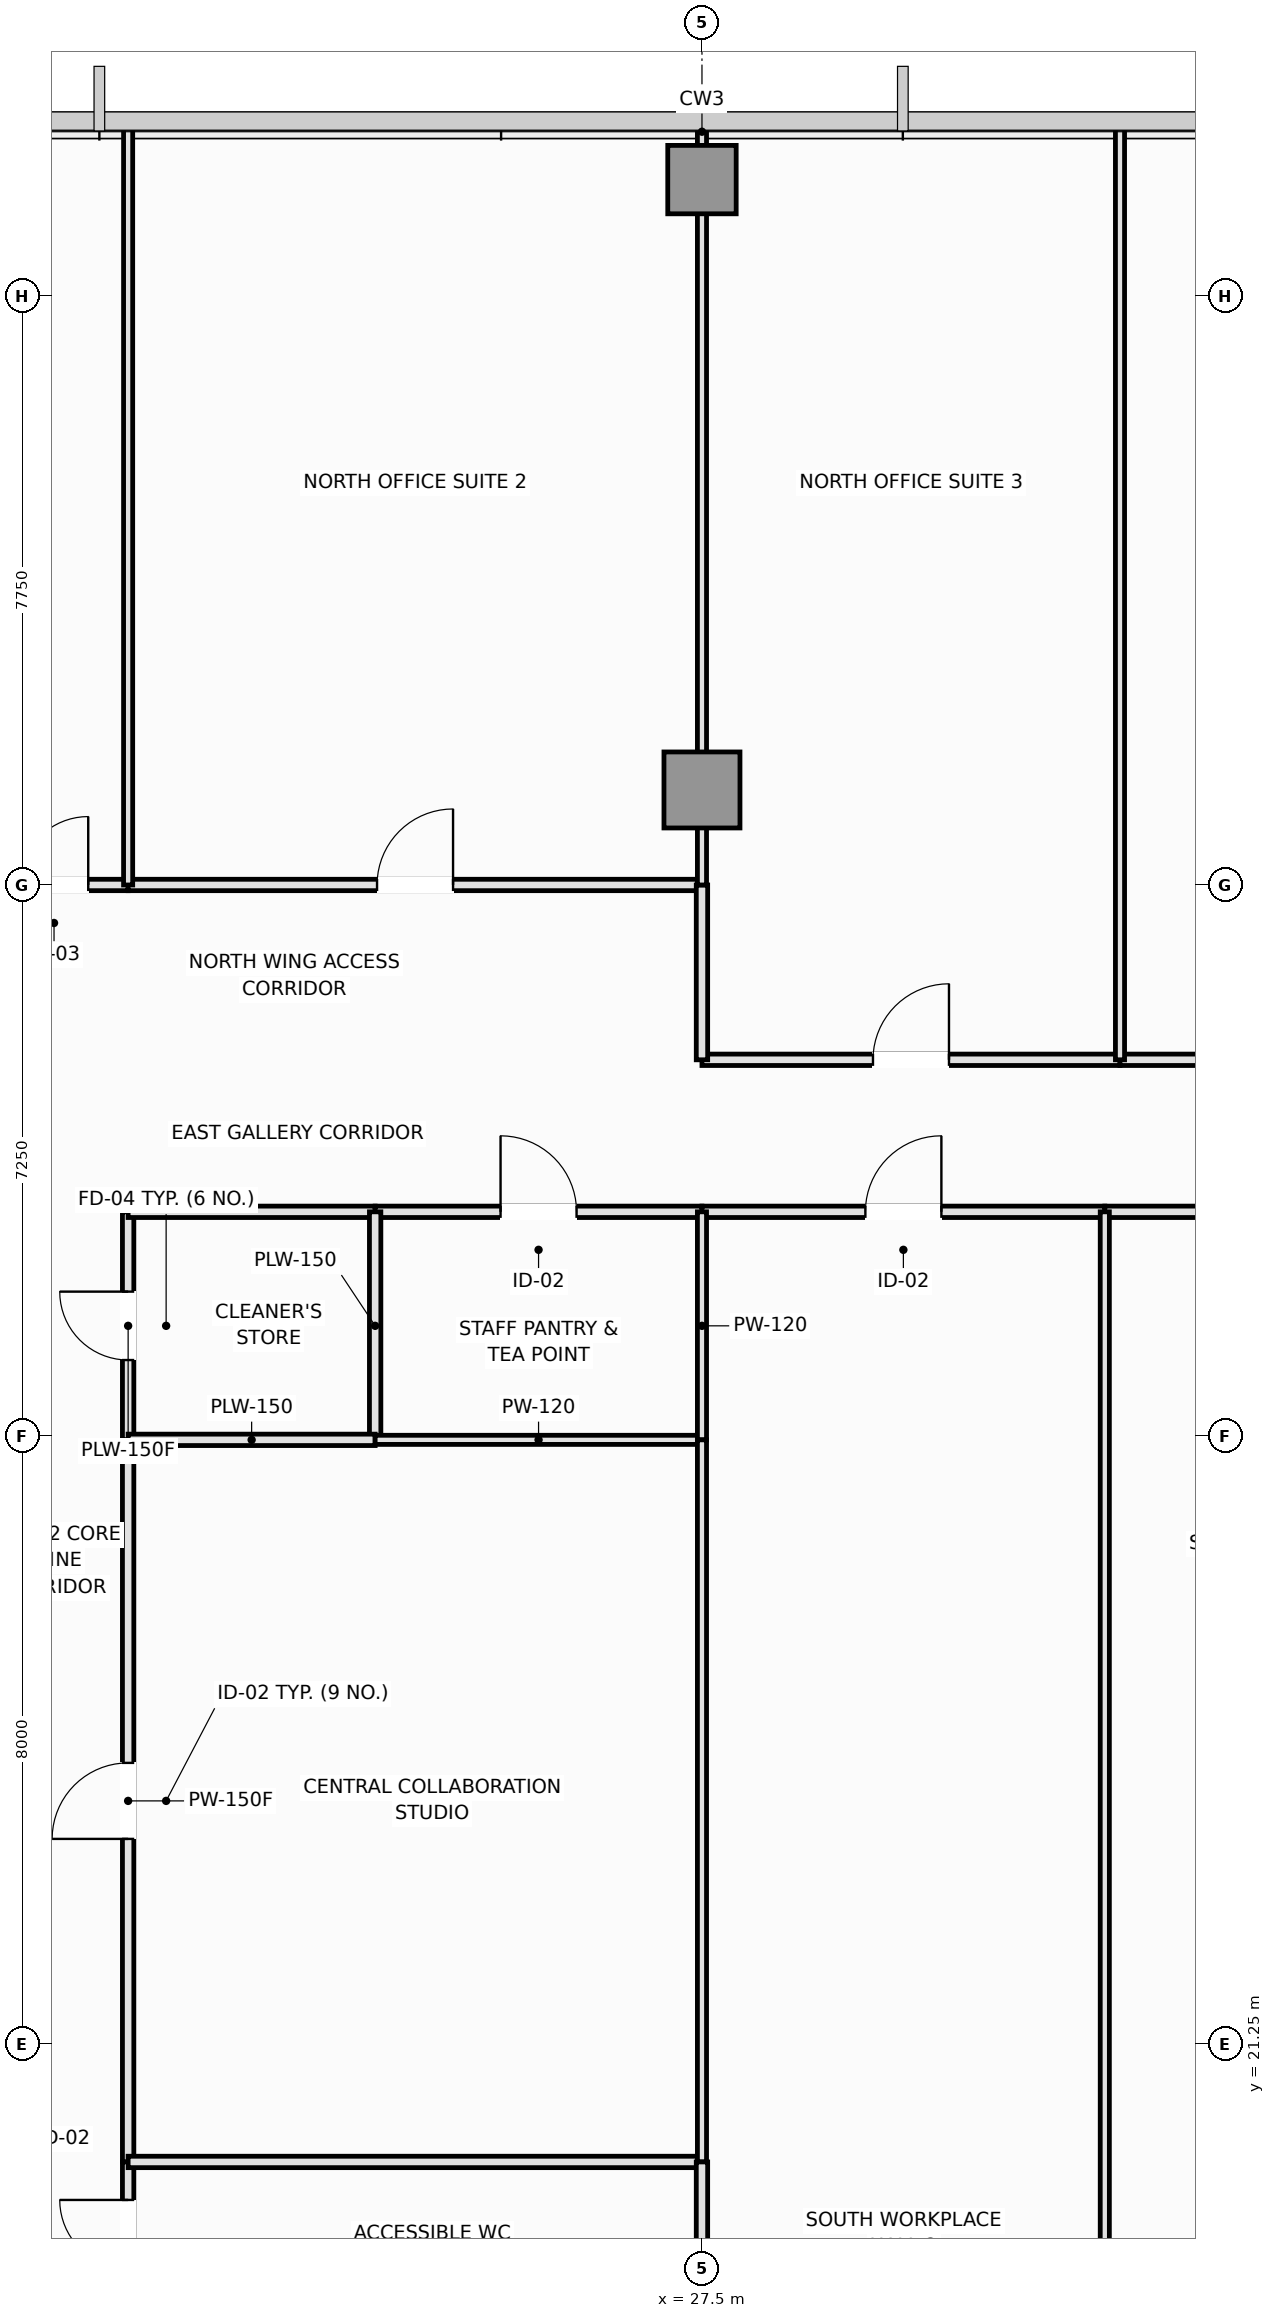
"""IFC4 building model, lengths in metres.
Left out: names, types, materials, properties, quantities, classifications, styles, units other than length and angle.
Written with IfcOpenShell. Run it as: python <this file> out.ifc"""

import sys

from ifc_helpers import new_model, si_unit, direction, frame, frame_2d, origin, origin_2d, place, context, subcontext, project, spatial, rectangle, extrude, element, fill, save


model = new_model("IFC4")
c1 = context("Model", 3, precision=1e-05, world=origin(), true_north=direction((0.0, 1.0)))
c2 = subcontext(c1, "Body", "Model", "MODEL_VIEW")
j1 = project(units=[si_unit("LENGTHUNIT", "METRE"), si_unit("PLANEANGLEUNIT", "RADIAN")], contexts=[c1])
p1 = place(None, origin())
s1 = spatial("IfcSite", under=j1, at=p1, CompositionType="ELEMENT")
p2 = place(p1, origin())
s2 = spatial("IfcBuilding", under=s1, at=p2, CompositionType="ELEMENT")
p3 = place(p2, frame((0.0, 0.0, 116.45)))
s3 = spatial("IfcBuildingStorey", under=s2, at=p3, CompositionType="ELEMENT", Elevation=116.45)
p4 = place(p3, frame((27.5, 37.75, 0.0), z_axis=(0.0, 0.0, 1.0), x_axis=(1.0, 0.0, 0.0)))
e1 = element("IfcColumn", 1, at=p4, inside=s3, PredefinedType="COLUMN", context=c2, shape_type="SweptSolid", body=[
    extrude(rectangle(XDim=1.0, YDim=1.0, at=origin_2d()), origin(), (0.0, 0.0, 1.0), 3.55),
])
p5 = place(p3, frame((27.5, 45.78, 0.0), z_axis=(0.0, 0.0, 1.0), x_axis=(1.0, 0.0, 0.0)))
e2 = element("IfcColumn", 2, at=p5, inside=s3, PredefinedType="COLUMN", context=c2, shape_type="SweptSolid", body=[
    extrude(rectangle(XDim=0.9, YDim=0.9, at=origin_2d()), origin(), (0.0, 0.0, 1.0), 3.55),
])
p6 = place(p3, frame((19.95, 29.2, 0.0), z_axis=(0.0, 0.0, 1.0), x_axis=(0.0, 1.0, 0.0)))
e3 = element("IfcWall", 3, at=p6, inside=s3, PredefinedType="PLUMBINGWALL", context=c2, shape_type="SweptSolid", body=[
    extrude(rectangle(XDim=3.0, YDim=0.15, at=frame_2d((1.5, 0.0))), origin(), (0.0, 0.0, 1.0), 3.37),
])
p7 = place(p6, frame((1.05, 0.0, 0.0)))
e4 = element("IfcOpeningElement", 4, at=p7, cuts=e3, PredefinedType="OPENING", context=c2, shape_type="SweptSolid", body=[
    extrude(rectangle(XDim=0.9, YDim=2.1, at=frame_2d((0.45, 1.05))), frame((0.0, 0.085, 0.0), z_axis=(0.0, -1.0, 0.0), x_axis=(1.0, 0.0, 0.0)), (0.0, 0.0, 1.0), 0.17),
])
p8 = place(p3, frame((19.95, 19.7, 0.0), z_axis=(0.0, 0.0, 1.0), x_axis=(0.0, 1.0, 0.0)))
e5 = element("IfcWall", 5, at=p8, inside=s3, PredefinedType="PARTITIONING", context=c2, shape_type="SweptSolid", body=[
    extrude(rectangle(XDim=9.5, YDim=0.15, at=frame_2d((4.75, 0.0))), origin(), (0.0, 0.0, 1.0), 3.37),
])
p9 = place(p8, frame((4.25, 0.0, 0.0)))
e6 = element("IfcOpeningElement", 6, at=p9, cuts=e5, PredefinedType="OPENING", context=c2, shape_type="SweptSolid", body=[
    extrude(rectangle(XDim=1.0, YDim=2.15, at=frame_2d((0.5, 1.075))), frame((0.0, 0.085, 0.0), z_axis=(0.0, -1.0, 0.0), x_axis=(1.0, 0.0, 0.0)), (0.0, 0.0, 1.0), 0.17),
])
p10 = place(p3, frame((19.95, 17.8, 0.0), z_axis=(0.0, 0.0, 1.0), x_axis=(0.0, 1.0, 0.0)))
e7 = element("IfcWall", 7, at=p10, inside=s3, PredefinedType="PLUMBINGWALL", context=c2, shape_type="SweptSolid", body=[
    extrude(rectangle(XDim=1.9, YDim=0.15, at=frame_2d((0.95, 0.0))), origin(), (0.0, 0.0, 1.0), 3.37),
])
p11 = place(p10, frame((0.5, 0.0, 0.0)))
e8 = element("IfcOpeningElement", 8, at=p11, cuts=e7, PredefinedType="OPENING", context=c2, shape_type="SweptSolid", body=[
    extrude(rectangle(XDim=0.9, YDim=2.1, at=frame_2d((0.45, 1.05))), frame((0.0, 0.085, 0.0), z_axis=(0.0, -1.0, 0.0), x_axis=(1.0, 0.0, 0.0)), (0.0, 0.0, 1.0), 0.17),
])
p12 = place(p3, frame((18.0, 36.5, 0.0), z_axis=(0.0, 0.0, 1.0), x_axis=(1.0, 0.0, 0.0)))
e9 = element("IfcWall", 9, at=p12, inside=s3, PredefinedType="PARTITIONING", context=c2, shape_type="SweptSolid", body=[
    extrude(rectangle(XDim=1.95, YDim=0.15, at=frame_2d((0.975, 0.0))), origin(), (0.0, 0.0, 1.0), 3.37),
])
p13 = place(p12, frame((0.525, 0.0, 0.0)))
e10 = element("IfcOpeningElement", 10, at=p13, cuts=e9, PredefinedType="OPENING", context=c2, shape_type="SweptSolid", body=[
    extrude(rectangle(XDim=0.9, YDim=2.1, at=frame_2d((0.45, 1.05))), frame((0.0, 0.085, 0.0), z_axis=(0.0, -1.0, 0.0), x_axis=(1.0, 0.0, 0.0)), (0.0, 0.0, 1.0), 0.17),
])
p14 = place(p3, frame((19.95, 32.2, 0.0), z_axis=(0.0, 0.0, 1.0), x_axis=(1.0, 0.0, 0.0)))
e11 = element("IfcWall", 11, at=p14, inside=s3, PredefinedType="PLUMBINGWALL", context=c2, shape_type="SweptSolid", body=[
    extrude(rectangle(XDim=3.25, YDim=0.15, at=frame_2d((1.625, 0.0))), origin(), (0.0, 0.0, 1.0), 3.37),
])
p15 = place(p3, frame((23.2, 32.2, 0.0), z_axis=(0.0, 0.0, 1.0), x_axis=(1.0, 0.0, 0.0)))
e12 = element("IfcWall", 12, at=p15, inside=s3, PredefinedType="PARTITIONING", context=c2, shape_type="SweptSolid", body=[
    extrude(rectangle(XDim=4.3, YDim=0.15, at=frame_2d((2.15, 0.0))), origin(), (0.0, 0.0, 1.0), 3.37),
])
p16 = place(p15, frame((1.65, 0.0, 0.0)))
e13 = element("IfcOpeningElement", 13, at=p16, cuts=e12, PredefinedType="OPENING", context=c2, shape_type="SweptSolid", body=[
    extrude(rectangle(XDim=1.0, YDim=2.15, at=frame_2d((0.5, 1.075))), frame((0.0, 0.085, 0.0), z_axis=(0.0, -1.0, 0.0), x_axis=(1.0, 0.0, 0.0)), (0.0, 0.0, 1.0), 0.17),
])
p17 = place(p3, frame((27.5, 32.2, 0.0), z_axis=(0.0, 0.0, 1.0), x_axis=(1.0, 0.0, 0.0)))
e14 = element("IfcWall", 14, at=p17, inside=s3, PredefinedType="PARTITIONING", context=c2, shape_type="SweptSolid", body=[
    extrude(rectangle(XDim=5.3, YDim=0.15, at=frame_2d((2.65, 0.0))), origin(), (0.0, 0.0, 1.0), 3.37),
])
p18 = place(p17, frame((2.15, 0.0, 0.0)))
e15 = element("IfcOpeningElement", 15, at=p18, cuts=e14, PredefinedType="OPENING", context=c2, shape_type="SweptSolid", body=[
    extrude(rectangle(XDim=1.0, YDim=2.15, at=frame_2d((0.5, 1.075))), frame((0.0, 0.085, 0.0), z_axis=(0.0, -1.0, 0.0), x_axis=(1.0, 0.0, 0.0)), (0.0, 0.0, 1.0), 0.17),
])
p19 = place(p3, frame((32.8, 32.2, 0.0), z_axis=(0.0, 0.0, 1.0), x_axis=(1.0, 0.0, 0.0)))
e16 = element("IfcWall", 16, at=p19, inside=s3, PredefinedType="PARTITIONING", context=c2, shape_type="SweptSolid", body=[
    extrude(rectangle(XDim=5.4, YDim=0.15, at=frame_2d((2.7, 0.0))), origin(), (0.0, 0.0, 1.0), 3.37),
])
p20 = place(p19, frame((2.2, 0.0, 0.0)))
e17 = element("IfcOpeningElement", 17, at=p20, cuts=e16, PredefinedType="OPENING", context=c2, shape_type="SweptSolid", body=[
    extrude(rectangle(XDim=1.0, YDim=2.15, at=frame_2d((0.5, 1.075))), frame((0.0, 0.085, 0.0), z_axis=(0.0, -1.0, 0.0), x_axis=(1.0, 0.0, 0.0)), (0.0, 0.0, 1.0), 0.17),
])
p21 = place(p3, frame((27.5, 34.2, 0.0), z_axis=(0.0, 0.0, 1.0), x_axis=(1.0, 0.0, 0.0)))
e18 = element("IfcWall", 18, at=p21, inside=s3, PredefinedType="PARTITIONING", context=c2, shape_type="SweptSolid", body=[
    extrude(rectangle(XDim=5.5, YDim=0.15, at=frame_2d((2.75, 0.0))), origin(), (0.0, 0.0, 1.0), 3.37),
])
p22 = place(p21, frame((2.25, 0.0, 0.0)))
e19 = element("IfcOpeningElement", 19, at=p22, cuts=e18, PredefinedType="OPENING", context=c2, shape_type="SweptSolid", body=[
    extrude(rectangle(XDim=1.0, YDim=2.15, at=frame_2d((0.5, 1.075))), frame((0.0, 0.085, 0.0), z_axis=(0.0, -1.0, 0.0), x_axis=(1.0, 0.0, 0.0)), (0.0, 0.0, 1.0), 0.17),
])
p23 = place(p3, frame((33.0, 34.2, 0.0), z_axis=(0.0, 0.0, 1.0), x_axis=(1.0, 0.0, 0.0)))
e20 = element("IfcWall", 20, at=p23, inside=s3, PredefinedType="PARTITIONING", context=c2, shape_type="SweptSolid", body=[
    extrude(rectangle(XDim=5.2, YDim=0.15, at=frame_2d((2.6, 0.0))), origin(), (0.0, 0.0, 1.0), 3.37),
])
p24 = place(p23, frame((2.1, 0.0, 0.0)))
e21 = element("IfcOpeningElement", 21, at=p24, cuts=e20, PredefinedType="OPENING", context=c2, shape_type="SweptSolid", body=[
    extrude(rectangle(XDim=1.0, YDim=2.15, at=frame_2d((0.5, 1.075))), frame((0.0, 0.085, 0.0), z_axis=(0.0, -1.0, 0.0), x_axis=(1.0, 0.0, 0.0)), (0.0, 0.0, 1.0), 0.17),
])
p25 = place(p3, frame((19.95, 36.5, 0.0), z_axis=(0.0, 0.0, 1.0), x_axis=(1.0, 0.0, 0.0)))
e22 = element("IfcWall", 22, at=p25, inside=s3, PredefinedType="PARTITIONING", context=c2, shape_type="SweptSolid", body=[
    extrude(rectangle(XDim=7.55, YDim=0.15, at=frame_2d((3.775, 0.0))), origin(), (0.0, 0.0, 1.0), 3.37),
])
p26 = place(p25, frame((3.275, 0.0, 0.0)))
e23 = element("IfcOpeningElement", 23, at=p26, cuts=e22, PredefinedType="OPENING", context=c2, shape_type="SweptSolid", body=[
    extrude(rectangle(XDim=1.0, YDim=2.15, at=frame_2d((0.5, 1.075))), frame((0.0, 0.085, 0.0), z_axis=(0.0, -1.0, 0.0), x_axis=(1.0, 0.0, 0.0)), (0.0, 0.0, 1.0), 0.17),
])
p27 = place(p3, frame((27.5, 34.2, 0.0), z_axis=(0.0, 0.0, 1.0), x_axis=(0.0, 1.0, 0.0)))
e24 = element("IfcWall", 24, at=p27, inside=s3, PredefinedType="PARTITIONING", context=c2, shape_type="SweptSolid", body=[
    extrude(rectangle(XDim=2.3, YDim=0.15, at=frame_2d((1.15, 0.0))), origin(), (0.0, 0.0, 1.0), 3.37),
])
p28 = place(p3, frame((23.2, 29.2, 0.0), z_axis=(0.0, 0.0, 1.0), x_axis=(0.0, 1.0, 0.0)))
e25 = element("IfcWall", 25, at=p28, inside=s3, PredefinedType="PLUMBINGWALL", context=c2, shape_type="SweptSolid", body=[
    extrude(rectangle(XDim=3.0, YDim=0.15, at=frame_2d((1.5, 0.0))), origin(), (0.0, 0.0, 1.0), 3.37),
])
p29 = place(p3, frame((19.95, 29.2, 0.0), z_axis=(0.0, 0.0, 1.0), x_axis=(1.0, 0.0, 0.0)))
e26 = element("IfcWall", 26, at=p29, inside=s3, PredefinedType="PLUMBINGWALL", context=c2, shape_type="SweptSolid", body=[
    extrude(rectangle(XDim=3.25, YDim=0.15, at=frame_2d((1.625, 0.0))), origin(), (0.0, 0.0, 1.0), 3.37),
])
p30 = place(p3, frame((23.2, 29.2, 0.0), z_axis=(0.0, 0.0, 1.0), x_axis=(1.0, 0.0, 0.0)))
e27 = element("IfcWall", 27, at=p30, inside=s3, PredefinedType="PARTITIONING", context=c2, shape_type="SweptSolid", body=[
    extrude(rectangle(XDim=4.3, YDim=0.12, at=frame_2d((2.15, 0.0))), origin(), (0.0, 0.0, 1.0), 3.37),
])
p31 = place(p3, frame((27.5, 29.2, 0.0), z_axis=(0.0, 0.0, 1.0), x_axis=(0.0, 1.0, 0.0)))
e28 = element("IfcWall", 28, at=p31, inside=s3, PredefinedType="PARTITIONING", context=c2, shape_type="SweptSolid", body=[
    extrude(rectangle(XDim=3.0, YDim=0.12, at=frame_2d((1.5, 0.0))), origin(), (0.0, 0.0, 1.0), 3.37),
])
p32 = place(p3, frame((19.95, 19.7, 0.0), z_axis=(0.0, 0.0, 1.0), x_axis=(1.0, 0.0, 0.0)))
e29 = element("IfcWall", 29, at=p32, inside=s3, PredefinedType="PLUMBINGWALL", context=c2, shape_type="SweptSolid", body=[
    extrude(rectangle(XDim=7.55, YDim=0.15, at=frame_2d((3.775, 0.0))), origin(), (0.0, 0.0, 1.0), 3.37),
])
p33 = place(p3, frame((27.5, 19.7, 0.0), z_axis=(0.0, 0.0, 1.0), x_axis=(0.0, 1.0, 0.0)))
e30 = element("IfcWall", 30, at=p33, inside=s3, PredefinedType="PARTITIONING", context=c2, shape_type="SweptSolid", body=[
    extrude(rectangle(XDim=9.5, YDim=0.12, at=frame_2d((4.75, 0.0))), origin(), (0.0, 0.0, 1.0), 3.37),
])
p34 = place(p3, frame((27.5, 17.8, 0.0), z_axis=(0.0, 0.0, 1.0), x_axis=(0.0, 1.0, 0.0)))
e31 = element("IfcWall", 31, at=p34, inside=s3, PredefinedType="PLUMBINGWALL", context=c2, shape_type="SweptSolid", body=[
    extrude(rectangle(XDim=1.9, YDim=0.15, at=frame_2d((0.95, 0.0))), origin(), (0.0, 0.0, 1.0), 3.37),
])
p35 = place(p3, frame((32.8, 3.51, 0.0), z_axis=(0.0, 0.0, 1.0), x_axis=(0.0, 1.0, 0.0)))
e32 = element("IfcWall", 32, at=p35, inside=s3, PredefinedType="PARTITIONING", context=c2, shape_type="SweptSolid", body=[
    extrude(rectangle(XDim=28.69, YDim=0.12, at=frame_2d((14.345, 0.0))), origin(), (0.0, 0.0, 1.0), 3.37),
])
p36 = place(p3, frame((19.95, 36.5, 0.0), z_axis=(0.0, 0.0, 1.0), x_axis=(0.0, 1.0, 0.0)))
e33 = element("IfcWall", 33, at=p36, inside=s3, PredefinedType="PARTITIONING", context=c2, shape_type="SweptSolid", body=[
    extrude(rectangle(XDim=9.99, YDim=0.12, at=frame_2d((4.995, 0.0))), origin(), (0.0, 0.0, 1.0), 3.37),
])
p37 = place(p3, frame((27.5, 36.5, 0.0), z_axis=(0.0, 0.0, 1.0), x_axis=(0.0, 1.0, 0.0)))
e34 = element("IfcWall", 34, at=p37, inside=s3, PredefinedType="PARTITIONING", context=c2, shape_type="SweptSolid", body=[
    extrude(rectangle(XDim=9.99, YDim=0.12, at=frame_2d((4.995, 0.0))), origin(), (0.0, 0.0, 1.0), 2.87),
])
p38 = place(p3, frame((33.0, 34.2, 0.0), z_axis=(0.0, 0.0, 1.0), x_axis=(0.0, 1.0, 0.0)))
e35 = element("IfcWall", 35, at=p38, inside=s3, PredefinedType="PARTITIONING", context=c2, shape_type="SweptSolid", body=[
    extrude(rectangle(XDim=12.29, YDim=0.12, at=frame_2d((6.145, 0.0))), origin(), (0.0, 0.0, 1.0), 3.37),
])
p39 = place(p7, origin())
e36 = element("IfcDoor", 36, at=p39, inside=s3, OperationType="SINGLE_SWING_RIGHT", PredefinedType="DOOR", context=c2, shape_type="SweptSolid", body=[
    extrude(rectangle(XDim=0.9, YDim=2.1, at=frame_2d((0.45, 1.05))), frame((0.0, 0.025, 0.0), z_axis=(0.0, -1.0, 0.0), x_axis=(1.0, 0.0, 0.0)), (0.0, 0.0, 1.0), 0.05),
])
fill(e4, e36)
p40 = place(p9, origin())
e37 = element("IfcDoor", 37, at=p40, inside=s3, OperationType="SINGLE_SWING_LEFT", PredefinedType="DOOR", context=c2, shape_type="SweptSolid", body=[
    extrude(rectangle(XDim=1.0, YDim=2.15, at=frame_2d((0.5, 1.075))), frame((0.0, 0.025, 0.0), z_axis=(0.0, -1.0, 0.0), x_axis=(1.0, 0.0, 0.0)), (0.0, 0.0, 1.0), 0.05),
])
fill(e6, e37)
p41 = place(p11, origin())
e38 = element("IfcDoor", 38, at=p41, inside=s3, OperationType="SINGLE_SWING_RIGHT", PredefinedType="DOOR", context=c2, shape_type="SweptSolid", body=[
    extrude(rectangle(XDim=0.9, YDim=2.1, at=frame_2d((0.45, 1.05))), frame((0.0, 0.025, 0.0), z_axis=(0.0, -1.0, 0.0), x_axis=(1.0, 0.0, 0.0)), (0.0, 0.0, 1.0), 0.05),
])
fill(e8, e38)
p42 = place(p13, origin())
e39 = element("IfcDoor", 39, at=p42, inside=s3, OperationType="SINGLE_SWING_RIGHT", PredefinedType="DOOR", context=c2, shape_type="SweptSolid", body=[
    extrude(rectangle(XDim=0.9, YDim=2.1, at=frame_2d((0.45, 1.05))), frame((0.0, 0.025, 0.0), z_axis=(0.0, -1.0, 0.0), x_axis=(1.0, 0.0, 0.0)), (0.0, 0.0, 1.0), 0.05),
])
fill(e10, e39)
p43 = place(p16, origin())
e40 = element("IfcDoor", 40, at=p43, inside=s3, OperationType="SINGLE_SWING_LEFT", PredefinedType="DOOR", context=c2, shape_type="SweptSolid", body=[
    extrude(rectangle(XDim=1.0, YDim=2.15, at=frame_2d((0.5, 1.075))), frame((0.0, 0.025, 0.0), z_axis=(0.0, -1.0, 0.0), x_axis=(1.0, 0.0, 0.0)), (0.0, 0.0, 1.0), 0.05),
])
fill(e13, e40)
p44 = place(p18, origin())
e41 = element("IfcDoor", 41, at=p44, inside=s3, OperationType="SINGLE_SWING_RIGHT", PredefinedType="DOOR", context=c2, shape_type="SweptSolid", body=[
    extrude(rectangle(XDim=1.0, YDim=2.15, at=frame_2d((0.5, 1.075))), frame((0.0, 0.025, 0.0), z_axis=(0.0, -1.0, 0.0), x_axis=(1.0, 0.0, 0.0)), (0.0, 0.0, 1.0), 0.05),
])
fill(e15, e41)
p45 = place(p22, origin())
e42 = element("IfcDoor", 42, at=p45, inside=s3, OperationType="SINGLE_SWING_RIGHT", PredefinedType="DOOR", context=c2, shape_type="SweptSolid", body=[
    extrude(rectangle(XDim=1.0, YDim=2.15, at=frame_2d((0.5, 1.075))), frame((0.0, 0.025, 0.0), z_axis=(0.0, -1.0, 0.0), x_axis=(1.0, 0.0, 0.0)), (0.0, 0.0, 1.0), 0.05),
])
fill(e19, e42)
p46 = place(p26, origin())
e43 = element("IfcDoor", 43, at=p46, inside=s3, OperationType="SINGLE_SWING_RIGHT", PredefinedType="DOOR", context=c2, shape_type="SweptSolid", body=[
    extrude(rectangle(XDim=1.0, YDim=2.15, at=frame_2d((0.5, 1.075))), frame((0.0, 0.025, 0.0), z_axis=(0.0, -1.0, 0.0), x_axis=(1.0, 0.0, 0.0)), (0.0, 0.0, 1.0), 0.05),
])
fill(e23, e43)
save(model, sys.argv[1])
